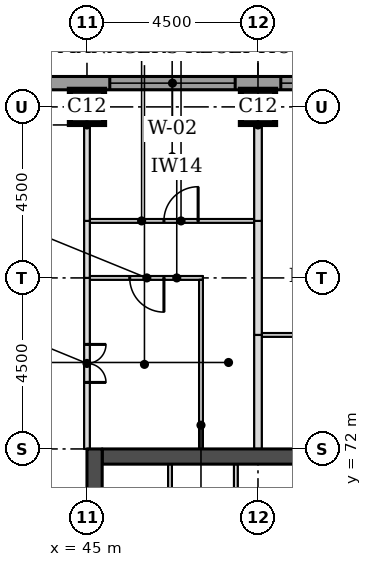
"""IFC4 building model, lengths in metres.
Left out: names, types, materials, properties, quantities, classifications, styles, units other than length and angle.
Written with IfcOpenShell. Run it as: python <this file> out.ifc"""

import sys

from ifc_helpers import new_model, si_unit, direction, frame, frame_2d, origin, origin_2d, place, context, subcontext, project, spatial, rectangle, extrude, element, fill, save


model = new_model("IFC4")
c1 = context("Model", 3, precision=1e-05, world=origin(), true_north=direction((0.0, 1.0)))
c2 = subcontext(c1, "Body", "Model", "MODEL_VIEW")
j1 = project(units=[si_unit("LENGTHUNIT", "METRE"), si_unit("PLANEANGLEUNIT", "RADIAN")], contexts=[c1])
p1 = place(None, origin())
s1 = spatial("IfcSite", under=j1, at=p1, CompositionType="ELEMENT")
p2 = place(p1, origin())
s2 = spatial("IfcBuilding", under=s1, at=p2, CompositionType="ELEMENT")
p3 = place(p2, frame((0.0, 0.0, 184.7)))
s3 = spatial("IfcBuildingStorey", under=s2, at=p3, CompositionType="ELEMENT", Elevation=184.7)
for number, where, z_axis, x_axis in (
    (1, (45.0, 81.0, 0.0), (0.0, 0.0, 1.0), (1.0, 0.0, 0.0)),
    (2, (49.5, 81.0, 0.0), (0.0, 0.0, 1.0), (1.0, 0.0, 0.0)),
):
    element("IfcColumn", number, at=place(p3, frame(where, z_axis=z_axis, x_axis=x_axis)), inside=s3, PredefinedType="COLUMN", context=c2, shape_type="SweptSolid", body=[
        extrude(rectangle(XDim=0.9, YDim=0.9, at=origin_2d()), origin(), (0.0, 0.0, 1.0), 3.7),
    ])
p4 = place(p3, frame((45.4, 71.8, 0.0), z_axis=(0.0, 0.0, 1.0), x_axis=(1.0, 0.0, 0.0)))
e3 = element("IfcWall", 3, at=p4, inside=s3, PredefinedType="SHEAR", context=c2, shape_type="SweptSolid", body=[
    extrude(rectangle(XDim=21.7, YDim=0.4, at=frame_2d((10.85, 0.0))), origin(), (0.0, 0.0, 1.0), 3.7),
])
p5 = place(p3, frame((45.2, 49.5, 0.0), z_axis=(0.0, 0.0, 1.0), x_axis=(0.0, 1.0, 0.0)))
e4 = element("IfcWall", 4, at=p5, inside=s3, PredefinedType="SHEAR", context=c2, shape_type="SweptSolid", body=[
    extrude(rectangle(XDim=22.5, YDim=0.4, at=frame_2d((11.25, 0.0))), origin(), (0.0, 0.0, 1.0), 3.7),
])
p6 = place(p5, frame((4.2, 0.0, 0.0)))
e5 = element("IfcOpeningElement", 5, at=p6, cuts=e4, PredefinedType="OPENING", context=c2, shape_type="SweptSolid", body=[
    extrude(rectangle(XDim=1.8, YDim=2.1, at=frame_2d((0.9, 1.05))), frame((0.0, 0.21, 0.0), z_axis=(0.0, -1.0, 0.0), x_axis=(1.0, 0.0, 0.0)), (0.0, 0.0, 1.0), 0.42),
])
p7 = place(p5, frame((6.9, 0.0, 0.0)))
e6 = element("IfcOpeningElement", 6, at=p7, cuts=e4, PredefinedType="OPENING", context=c2, shape_type="SweptSolid", body=[
    extrude(rectangle(XDim=1.1, YDim=2.1, at=frame_2d((0.55, 1.05))), frame((0.0, 0.21, 0.0), z_axis=(0.0, -1.0, 0.0), x_axis=(1.0, 0.0, 0.0)), (0.0, 0.0, 1.0), 0.42),
])
p8 = place(p5, frame((13.6, 0.0, 0.0)))
e7 = element("IfcOpeningElement", 7, at=p8, cuts=e4, PredefinedType="OPENING", context=c2, shape_type="SweptSolid", body=[
    extrude(rectangle(XDim=1.1, YDim=2.1, at=frame_2d((0.55, 1.05))), frame((0.0, 0.21, 0.0), z_axis=(0.0, -1.0, 0.0), x_axis=(1.0, 0.0, 0.0)), (0.0, 0.0, 1.0), 0.42),
])
p9 = place(p5, frame((16.5, 0.0, 0.0)))
e8 = element("IfcOpeningElement", 8, at=p9, cuts=e4, PredefinedType="OPENING", context=c2, shape_type="SweptSolid", body=[
    extrude(rectangle(XDim=1.8, YDim=2.1, at=frame_2d((0.9, 1.05))), frame((0.0, 0.21, 0.0), z_axis=(0.0, -1.0, 0.0), x_axis=(1.0, 0.0, 0.0)), (0.0, 0.0, 1.0), 0.42),
])
p10 = place(p3, frame((72.331, 81.625, 0.0), z_axis=(0.0, 0.0, 1.0), x_axis=(-1.0, 0.0, 0.0)))
e9 = element("IfcWall", 9, at=p10, inside=s3, PredefinedType="STANDARD", context=c2, shape_type="SweptSolid", body=[
    extrude(rectangle(XDim=32.163, YDim=0.35, at=frame_2d((16.081, 0.0))), origin(), (0.0, 0.0, 1.0), 3.525),
])
p11 = place(p10, frame((5.431, 0.0, 0.9)))
e10 = element("IfcOpeningElement", 10, at=p11, cuts=e9, PredefinedType="OPENING", context=c2, shape_type="SweptSolid", body=[
    extrude(rectangle(XDim=3.3, YDim=1.9, at=frame_2d((1.65, 0.95))), frame((0.0, 0.185, 0.0), z_axis=(0.0, -1.0, 0.0), x_axis=(1.0, 0.0, 0.0)), (0.0, 0.0, 1.0), 0.37),
])
p12 = place(p10, frame((9.931, 0.0, 0.9)))
e11 = element("IfcOpeningElement", 11, at=p12, cuts=e9, PredefinedType="OPENING", context=c2, shape_type="SweptSolid", body=[
    extrude(rectangle(XDim=3.3, YDim=1.9, at=frame_2d((1.65, 0.95))), frame((0.0, 0.185, 0.0), z_axis=(0.0, -1.0, 0.0), x_axis=(1.0, 0.0, 0.0)), (0.0, 0.0, 1.0), 0.37),
])
p13 = place(p10, frame((14.431, 0.0, 0.9)))
e12 = element("IfcOpeningElement", 12, at=p13, cuts=e9, PredefinedType="OPENING", context=c2, shape_type="SweptSolid", body=[
    extrude(rectangle(XDim=3.3, YDim=1.9, at=frame_2d((1.65, 0.95))), frame((0.0, 0.185, 0.0), z_axis=(0.0, -1.0, 0.0), x_axis=(1.0, 0.0, 0.0)), (0.0, 0.0, 1.0), 0.37),
])
p14 = place(p10, frame((18.931, 0.0, 0.9)))
e13 = element("IfcOpeningElement", 13, at=p14, cuts=e9, PredefinedType="OPENING", context=c2, shape_type="SweptSolid", body=[
    extrude(rectangle(XDim=3.3, YDim=1.9, at=frame_2d((1.65, 0.95))), frame((0.0, 0.185, 0.0), z_axis=(0.0, -1.0, 0.0), x_axis=(1.0, 0.0, 0.0)), (0.0, 0.0, 1.0), 0.37),
])
p15 = place(p10, frame((23.431, 0.0, 0.9)))
e14 = element("IfcOpeningElement", 14, at=p15, cuts=e9, PredefinedType="OPENING", context=c2, shape_type="SweptSolid", body=[
    extrude(rectangle(XDim=3.3, YDim=1.9, at=frame_2d((1.65, 0.95))), frame((0.0, 0.185, 0.0), z_axis=(0.0, -1.0, 0.0), x_axis=(1.0, 0.0, 0.0)), (0.0, 0.0, 1.0), 0.37),
])
p16 = place(p3, frame((49.6, 75.0, 0.0), z_axis=(0.0, 0.0, 1.0), x_axis=(1.0, 0.0, 0.0)))
e15 = element("IfcWall", 15, at=p16, inside=s3, PredefinedType="PARTITIONING", context=c2, shape_type="SweptSolid", body=[
    extrude(rectangle(XDim=4.4, YDim=0.1, at=frame_2d((2.2, 0.0))), origin(), (0.0, 0.0, 1.0), 3.55),
])
p17 = place(p16, frame((1.75, 0.0, 0.0)))
e16 = element("IfcOpeningElement", 16, at=p17, cuts=e15, PredefinedType="OPENING", context=c2, shape_type="SweptSolid", body=[
    extrude(rectangle(XDim=0.9, YDim=2.1, at=frame_2d((0.45, 1.05))), frame((0.0, 0.06, 0.0), z_axis=(0.0, -1.0, 0.0), x_axis=(1.0, 0.0, 0.0)), (0.0, 0.0, 1.0), 0.12),
])
p18 = place(p3, frame((45.075, 76.5, 0.0), z_axis=(0.0, 0.0, 1.0), x_axis=(1.0, 0.0, 0.0)))
e17 = element("IfcWall", 17, at=p18, inside=s3, PredefinedType="PARTITIONING", context=c2, shape_type="SweptSolid", body=[
    extrude(rectangle(XDim=2.975, YDim=0.1, at=frame_2d((1.488, 0.0))), origin(), (0.0, 0.0, 1.0), 3.55),
])
p19 = place(p18, frame((1.05, 0.0, 0.0)))
e18 = element("IfcOpeningElement", 18, at=p19, cuts=e17, PredefinedType="OPENING", context=c2, shape_type="SweptSolid", body=[
    extrude(rectangle(XDim=0.9, YDim=2.1, at=frame_2d((0.45, 1.05))), frame((0.0, 0.06, 0.0), z_axis=(0.0, -1.0, 0.0), x_axis=(1.0, 0.0, 0.0)), (0.0, 0.0, 1.0), 0.12),
])
p20 = place(p3, frame((45.075, 78.0, 0.0), z_axis=(0.0, 0.0, 1.0), x_axis=(1.0, 0.0, 0.0)))
e19 = element("IfcWall", 19, at=p20, inside=s3, PredefinedType="PARTITIONING", context=c2, shape_type="SweptSolid", body=[
    extrude(rectangle(XDim=4.325, YDim=0.1, at=frame_2d((2.163, 0.0))), origin(), (0.0, 0.0, 1.0), 3.55),
])
p21 = place(p20, frame((1.95, 0.0, 0.0)))
e20 = element("IfcOpeningElement", 20, at=p21, cuts=e19, PredefinedType="OPENING", context=c2, shape_type="SweptSolid", body=[
    extrude(rectangle(XDim=0.9, YDim=2.1, at=frame_2d((0.45, 1.05))), frame((0.0, 0.06, 0.0), z_axis=(0.0, -1.0, 0.0), x_axis=(1.0, 0.0, 0.0)), (0.0, 0.0, 1.0), 0.12),
])
p22 = place(p3, frame((45.0, 72.0, 0.0), z_axis=(0.0, 0.0, 1.0), x_axis=(0.0, 1.0, 0.0)))
e21 = element("IfcWall", 21, at=p22, inside=s3, PredefinedType="PARTITIONING", context=c2, shape_type="SweptSolid", body=[
    extrude(rectangle(XDim=4.5, YDim=0.15, at=frame_2d((2.25, 0.0))), origin(), (0.0, 0.0, 1.0), 3.022),
])
p23 = place(p22, frame((1.75, 0.0, 0.0)))
e22 = element("IfcOpeningElement", 22, at=p23, cuts=e21, PredefinedType="OPENING", context=c2, shape_type="SweptSolid", body=[
    extrude(rectangle(XDim=1.0, YDim=2.1, at=frame_2d((0.5, 1.05))), frame((0.0, 0.085, 0.0), z_axis=(0.0, -1.0, 0.0), x_axis=(1.0, 0.0, 0.0)), (0.0, 0.0, 1.0), 0.17),
])
p24 = place(p3, frame((48.0, 72.0, 0.0), z_axis=(0.0, 0.0, 1.0), x_axis=(0.0, 1.0, 0.0)))
e23 = element("IfcWall", 23, at=p24, inside=s3, PredefinedType="PARTITIONING", context=c2, shape_type="SweptSolid", body=[
    extrude(rectangle(XDim=4.45, YDim=0.1, at=frame_2d((2.225, 0.0))), origin(), (0.0, 0.0, 1.0), 3.55),
])
for number, where, z_axis, x_axis in (
    (24, (49.5, 72.0, 0.0), (0.0, 0.0, 1.0), (0.0, 1.0, 0.0)),
    (25, (49.5, 75.0, 0.0), (0.0, 0.0, 1.0), (0.0, 1.0, 0.0)),
):
    element("IfcWall", number, at=place(p3, frame(where, z_axis=z_axis, x_axis=x_axis)), inside=s3, PredefinedType="PARTITIONING", context=c2, shape_type="SweptSolid", body=[
        extrude(rectangle(XDim=3.0, YDim=0.2, at=frame_2d((1.5, 0.0))), origin(), (0.0, 0.0, 1.0), 3.55),
    ])
p25 = place(p3, frame((45.0, 76.5, 0.0), z_axis=(0.0, 0.0, 1.0), x_axis=(0.0, 1.0, 0.0)))
e26 = element("IfcWall", 26, at=p25, inside=s3, PredefinedType="PARTITIONING", context=c2, shape_type="SweptSolid", body=[
    extrude(rectangle(XDim=1.5, YDim=0.15, at=frame_2d((0.75, 0.0))), origin(), (0.0, 0.0, 1.0), 3.022),
])
p26 = place(p3, frame((45.0, 78.0, 0.0), z_axis=(0.0, 0.0, 1.0), x_axis=(0.0, 1.0, 0.0)))
e27 = element("IfcWall", 27, at=p26, inside=s3, PredefinedType="PARTITIONING", context=c2, shape_type="SweptSolid", body=[
    extrude(rectangle(XDim=3.45, YDim=0.15, at=frame_2d((1.725, 0.0))), origin(), (0.0, 0.0, 1.0), 3.022),
])
p27 = place(p3, frame((49.5, 78.0, 0.0), z_axis=(0.0, 0.0, 1.0), x_axis=(0.0, 1.0, 0.0)))
e28 = element("IfcWall", 28, at=p27, inside=s3, PredefinedType="PARTITIONING", context=c2, shape_type="SweptSolid", body=[
    extrude(rectangle(XDim=3.45, YDim=0.2, at=frame_2d((1.725, 0.0))), origin(), (0.0, 0.0, 1.0), 3.55),
])
for number, where, z_axis, x_axis in (
    (29, (47.185, 68.5, 0.0), (0.0, 0.0, 1.0), (0.0, 1.0, 0.0)),
    (30, (48.917, 68.5, 0.0), (0.0, 0.0, 1.0), (0.0, 1.0, 0.0)),
):
    element("IfcWall", number, at=place(p3, frame(where, z_axis=z_axis, x_axis=x_axis)), inside=s3, PredefinedType="PARTITIONING", context=c2, shape_type="SweptSolid", body=[
        extrude(rectangle(XDim=3.1, YDim=0.1, at=frame_2d((1.55, 0.0))), origin(), (0.0, 0.0, 1.0), 3.55),
    ])
p28 = place(p14, origin())
e31 = element("IfcWindow", 31, at=p28, inside=s3, PartitioningType="SINGLE_PANEL", PredefinedType="WINDOW", context=c2, shape_type="SweptSolid", body=[
    extrude(rectangle(XDim=3.3, YDim=1.9, at=frame_2d((1.65, 0.95))), frame((0.0, 0.085, 0.0), z_axis=(0.0, -1.0, 0.0), x_axis=(1.0, 0.0, 0.0)), (0.0, 0.0, 1.0), 0.06),
])
fill(e13, e31)
p29 = place(p15, origin())
e32 = element("IfcWindow", 32, at=p29, inside=s3, PartitioningType="SINGLE_PANEL", PredefinedType="WINDOW", context=c2, shape_type="SweptSolid", body=[
    extrude(rectangle(XDim=3.3, YDim=1.9, at=frame_2d((1.65, 0.95))), frame((0.0, 0.085, 0.0), z_axis=(0.0, -1.0, 0.0), x_axis=(1.0, 0.0, 0.0)), (0.0, 0.0, 1.0), 0.06),
])
fill(e14, e32)
p30 = place(p23, frame((1.0, 0.0, 0.0), z_axis=(0.0, 0.0, 1.0), x_axis=(-1.0, 0.0, 0.0)))
e33 = element("IfcDoor", 33, at=p30, inside=s3, OperationType="DOUBLE_DOOR_SINGLE_SWING", PredefinedType="DOOR", context=c2, shape_type="SweptSolid", body=[
    extrude(rectangle(XDim=1.0, YDim=2.1, at=frame_2d((0.5, 1.05))), frame((0.0, 0.025, 0.0), z_axis=(0.0, -1.0, 0.0), x_axis=(1.0, 0.0, 0.0)), (0.0, 0.0, 1.0), 0.05),
])
fill(e22, e33)
p31 = place(p19, frame((0.9, 0.0, 0.0), z_axis=(0.0, 0.0, 1.0), x_axis=(-1.0, 0.0, 0.0)))
e34 = element("IfcDoor", 34, at=p31, inside=s3, OperationType="SINGLE_SWING_LEFT", PredefinedType="DOOR", context=c2, shape_type="SweptSolid", body=[
    extrude(rectangle(XDim=0.9, YDim=2.1, at=frame_2d((0.45, 1.05))), frame((0.0, 0.025, 0.0), z_axis=(0.0, -1.0, 0.0), x_axis=(1.0, 0.0, 0.0)), (0.0, 0.0, 1.0), 0.05),
])
fill(e18, e34)
p32 = place(p21, origin())
e35 = element("IfcDoor", 35, at=p32, inside=s3, OperationType="SINGLE_SWING_RIGHT", PredefinedType="DOOR", context=c2, shape_type="SweptSolid", body=[
    extrude(rectangle(XDim=0.9, YDim=2.1, at=frame_2d((0.45, 1.05))), frame((0.0, 0.025, 0.0), z_axis=(0.0, -1.0, 0.0), x_axis=(1.0, 0.0, 0.0)), (0.0, 0.0, 1.0), 0.05),
])
fill(e20, e35)
save(model, sys.argv[1])
